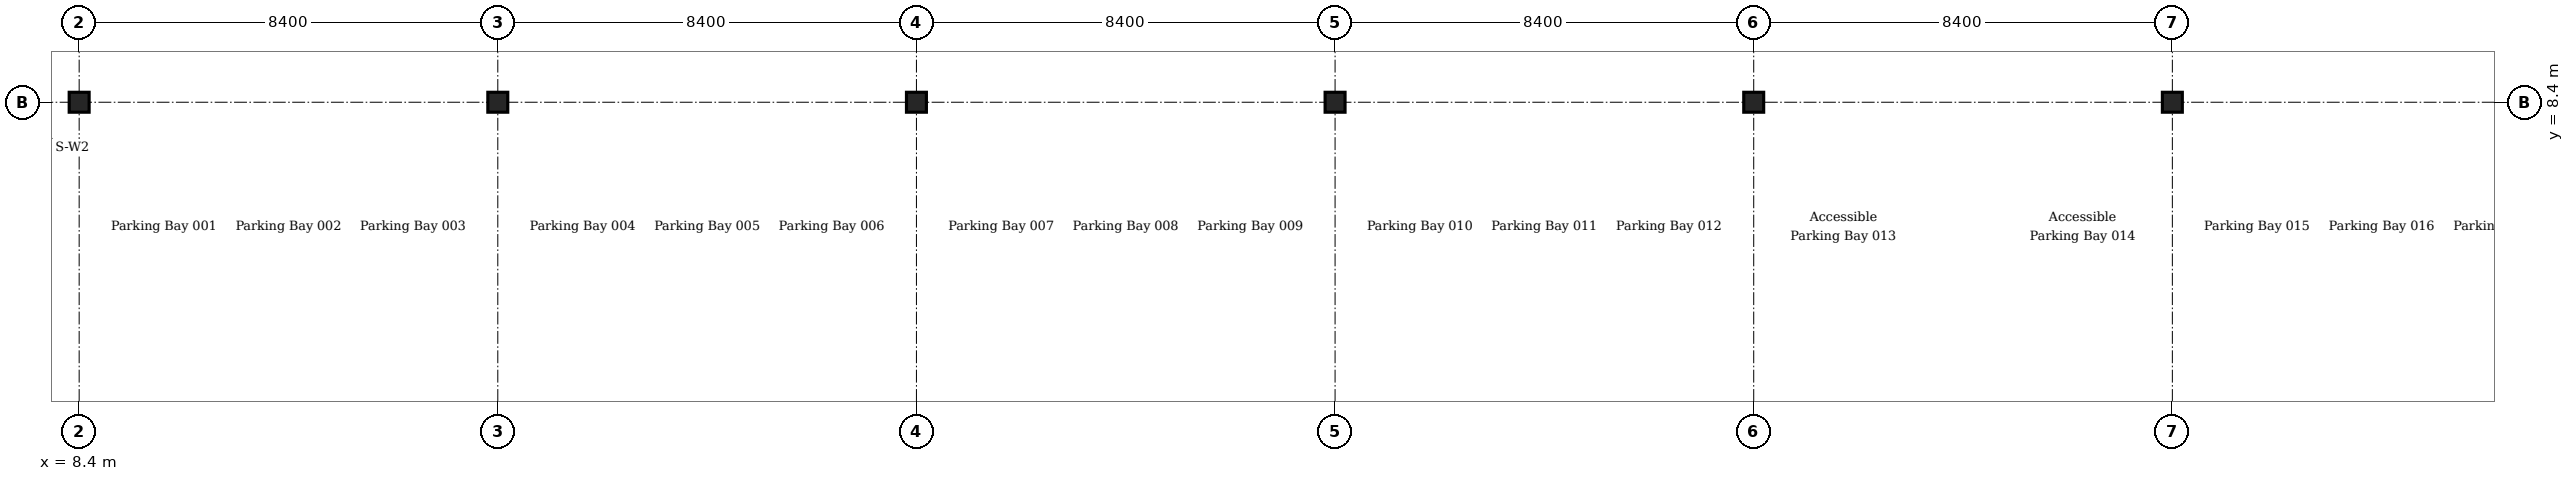
"""IFC4 building model, lengths in metres.
Left out: names, types, materials, properties, quantities, classifications, styles, units other than length and angle.
Written with IfcOpenShell. Run it as: python <this file> out.ifc"""

import sys

from ifc_helpers import new_model, si_unit, direction, frame, origin, origin_2d, place, context, subcontext, project, spatial, i_section, extrude, element, save


model = new_model("IFC4")
c1 = context("Model", 3, precision=1e-05, world=origin(), true_north=direction((0.0, 1.0)))
c2 = subcontext(c1, "Body", "Model", "MODEL_VIEW")
j1 = project(units=[si_unit("LENGTHUNIT", "METRE"), si_unit("PLANEANGLEUNIT", "RADIAN")], contexts=[c1])
p1 = place(None, origin())
s1 = spatial("IfcSite", under=j1, at=p1, CompositionType="ELEMENT")
p2 = place(p1, origin())
s2 = spatial("IfcBuilding", under=s1, at=p2, CompositionType="ELEMENT")
p3 = place(p2, frame((0.0, 0.0, -5.4)))
s3 = spatial("IfcBuildingStorey", under=s2, at=p3, CompositionType="ELEMENT", Elevation=-5.4)
for number, where, z_axis, x_axis in (
    (1, (8.4, 8.4, 0.0), (0.0, 0.0, 1.0), (1.0, 0.0, 0.0)),
    (2, (16.8, 8.4, 0.0), (0.0, 0.0, 1.0), (1.0, 0.0, 0.0)),
    (3, (25.2, 8.4, 0.0), (0.0, 0.0, 1.0), (1.0, 0.0, 0.0)),
    (4, (33.6, 8.4, 0.0), (0.0, 0.0, 1.0), (1.0, 0.0, 0.0)),
    (5, (42.0, 8.4, 0.0), (0.0, 0.0, 1.0), (1.0, 0.0, 0.0)),
    (6, (50.4, 8.4, 0.0), (0.0, 0.0, 1.0), (1.0, 0.0, 0.0)),
):
    element("IfcColumn", number, at=place(p3, frame(where, z_axis=z_axis, x_axis=x_axis)), inside=s3, PredefinedType="COLUMN", context=c2, shape_type="SweptSolid", body=[
        extrude(i_section(OverallWidth=0.4, OverallDepth=0.4, WebThickness=0.013, FlangeThickness=0.021, FilletRadius=0.022, at=origin_2d()), origin(), (0.0, 0.0, 1.0), 5.4),
    ])
save(model, sys.argv[1])
